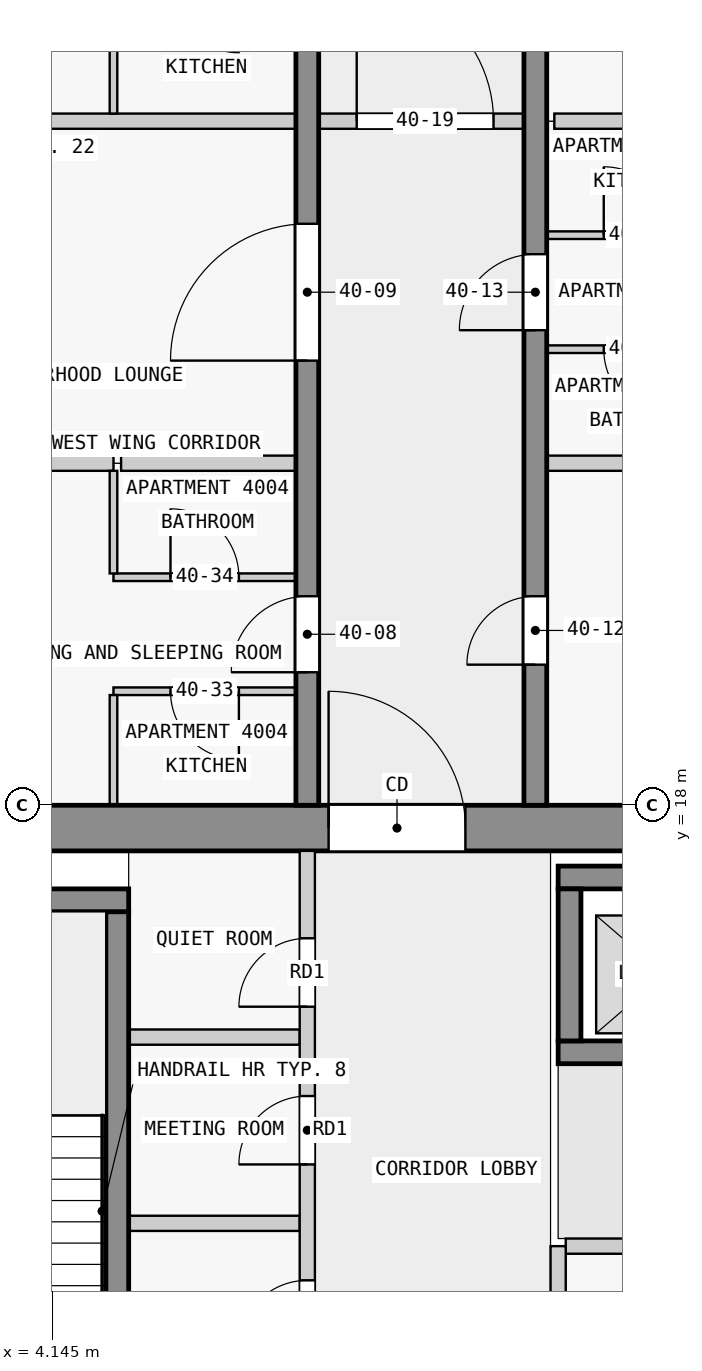
"""IFC4 building model, lengths in metres.
Left out: names, types, materials, properties, quantities, classifications, styles, units other than length and angle.
Written with IfcOpenShell. Run it as: python <this file> out.ifc"""

import sys

from ifc_helpers import new_model, si_unit, direction, frame, frame_2d, origin, place, context, subcontext, project, spatial, rectangle, extrude, element, fill, save


model = new_model("IFC4")
c1 = context("Model", 3, precision=1e-05, world=origin(), true_north=direction((0.0, 1.0)))
c2 = subcontext(c1, "Body", "Model", "MODEL_VIEW")
j1 = project(units=[si_unit("LENGTHUNIT", "METRE"), si_unit("PLANEANGLEUNIT", "RADIAN")], contexts=[c1])
p1 = place(None, origin())
s1 = spatial("IfcSite", under=j1, at=p1, CompositionType="ELEMENT")
p2 = place(p1, origin())
s2 = spatial("IfcBuilding", under=s1, at=p2, CompositionType="ELEMENT")
p3 = place(p2, frame((0.0, 0.0, 156.9)))
s3 = spatial("IfcBuildingStorey", under=s2, at=p3, CompositionType="ELEMENT", Elevation=156.9)
p4 = place(p3, frame((1.38, 17.7, 0.0), z_axis=(0.0, 0.0, 1.0), x_axis=(1.0, 0.0, 0.0)))
e1 = element("IfcWall", 1, at=p4, inside=s3, PredefinedType="SHEAR", context=c2, shape_type="SweptSolid", body=[
    extrude(rectangle(XDim=21.12, YDim=0.6, at=frame_2d((10.56, 0.0))), origin(), (0.0, 0.0, 1.0), 3.25),
])
p5 = place(p4, frame((6.4, 0.0, 0.0)))
e2 = element("IfcOpeningElement", 2, at=p5, cuts=e1, PredefinedType="OPENING", context=c2, shape_type="SweptSolid", body=[
    extrude(rectangle(XDim=1.8, YDim=2.1, at=frame_2d((0.9, 1.05))), frame((0.0, 0.31, 0.0), z_axis=(0.0, -1.0, 0.0), x_axis=(1.0, 0.0, 0.0)), (0.0, 0.0, 1.0), 0.62),
])
p6 = place(p3, frame((5.0, 10.2, 0.0), z_axis=(0.0, 0.0, 1.0), x_axis=(0.0, 1.0, 0.0)))
e3 = element("IfcWall", 3, at=p6, inside=s3, PredefinedType="SHEAR", context=c2, shape_type="SweptSolid", body=[
    extrude(rectangle(XDim=6.4, YDim=0.3, at=frame_2d((3.2, 0.0))), origin(), (0.0, 0.0, 1.0), 3.25),
])
p7 = place(p3, frame((2.3, 16.75, 0.0), z_axis=(0.0, 0.0, 1.0), x_axis=(1.0, 0.0, 0.0)))
e4 = element("IfcWall", 4, at=p7, inside=s3, PredefinedType="SHEAR", context=c2, shape_type="SweptSolid", body=[
    extrude(rectangle(XDim=2.85, YDim=0.3, at=frame_2d((1.425, 0.0))), origin(), (0.0, 0.0, 1.0), 3.25),
])
p8 = place(p3, frame((10.8, 17.05, 0.0), z_axis=(0.0, 0.0, 1.0), x_axis=(1.0, 0.0, 0.0)))
e5 = element("IfcWall", 5, at=p8, inside=s3, PredefinedType="SHEAR", context=c2, shape_type="SweptSolid", body=[
    extrude(rectangle(XDim=7.8, YDim=0.3, at=frame_2d((3.9, 0.0))), origin(), (0.0, 0.0, 1.0), 3.25),
])
p9 = place(p3, frame((10.8, 14.75, 0.0), z_axis=(0.0, 0.0, 1.0), x_axis=(1.0, 0.0, 0.0)))
e6 = element("IfcWall", 6, at=p9, inside=s3, PredefinedType="SHEAR", context=c2, shape_type="SweptSolid", body=[
    extrude(rectangle(XDim=7.8, YDim=0.3, at=frame_2d((3.9, 0.0))), origin(), (0.0, 0.0, 1.0), 3.25),
])
p10 = place(p9, frame((0.85, 0.0, 0.0)))
e7 = element("IfcOpeningElement", 7, at=p10, cuts=e6, PredefinedType="OPENING", context=c2, shape_type="SweptSolid", body=[
    extrude(rectangle(XDim=1.1, YDim=2.1, at=frame_2d((0.55, 1.05))), frame((0.0, 0.16, 0.0), z_axis=(0.0, -1.0, 0.0), x_axis=(1.0, 0.0, 0.0)), (0.0, 0.0, 1.0), 0.32),
])
p11 = place(p9, frame((3.35, 0.0, 0.0)))
e8 = element("IfcOpeningElement", 8, at=p11, cuts=e6, PredefinedType="OPENING", context=c2, shape_type="SweptSolid", body=[
    extrude(rectangle(XDim=1.1, YDim=2.1, at=frame_2d((0.55, 1.05))), frame((0.0, 0.16, 0.0), z_axis=(0.0, -1.0, 0.0), x_axis=(1.0, 0.0, 0.0)), (0.0, 0.0, 1.0), 0.32),
])
p12 = place(p9, frame((5.85, 0.0, 0.0)))
e9 = element("IfcOpeningElement", 9, at=p12, cuts=e6, PredefinedType="OPENING", context=c2, shape_type="SweptSolid", body=[
    extrude(rectangle(XDim=1.1, YDim=2.1, at=frame_2d((0.55, 1.05))), frame((0.0, 0.16, 0.0), z_axis=(0.0, -1.0, 0.0), x_axis=(1.0, 0.0, 0.0)), (0.0, 0.0, 1.0), 0.32),
])
p13 = place(p3, frame((10.95, 14.9, 0.0), z_axis=(0.0, 0.0, 1.0), x_axis=(0.0, 1.0, 0.0)))
e10 = element("IfcWall", 10, at=p13, inside=s3, PredefinedType="SHEAR", context=c2, shape_type="SweptSolid", body=[
    extrude(rectangle(XDim=2.0, YDim=0.3, at=frame_2d((1.0, 0.0))), origin(), (0.0, 0.0, 1.0), 3.25),
])
p14 = place(p3, frame((7.5, 18.0, 0.0), z_axis=(0.0, 0.0, 1.0), x_axis=(0.0, 1.0, 0.0)))
e11 = element("IfcWall", 11, at=p14, inside=s3, PredefinedType="SHEAR", context=c2, shape_type="SweptSolid", body=[
    extrude(rectangle(XDim=27.0, YDim=0.3, at=frame_2d((13.5, 0.0))), origin(), (0.0, 0.0, 1.0), 3.25),
])
p15 = place(p14, frame((1.75, 0.0, 0.0)))
e12 = element("IfcOpeningElement", 12, at=p15, cuts=e11, PredefinedType="OPENING", context=c2, shape_type="SweptSolid", body=[
    extrude(rectangle(XDim=1.0, YDim=2.1, at=frame_2d((0.5, 1.05))), frame((0.0, 0.16, 0.0), z_axis=(0.0, -1.0, 0.0), x_axis=(1.0, 0.0, 0.0)), (0.0, 0.0, 1.0), 0.32),
])
p16 = place(p14, frame((5.85, 0.0, 0.0)))
e13 = element("IfcOpeningElement", 13, at=p16, cuts=e11, PredefinedType="OPENING", context=c2, shape_type="SweptSolid", body=[
    extrude(rectangle(XDim=1.8, YDim=2.1, at=frame_2d((0.9, 1.05))), frame((0.0, 0.16, 0.0), z_axis=(0.0, -1.0, 0.0), x_axis=(1.0, 0.0, 0.0)), (0.0, 0.0, 1.0), 0.32),
])
p17 = place(p14, frame((13.05, 0.0, 0.0)))
e14 = element("IfcOpeningElement", 14, at=p17, cuts=e11, PredefinedType="OPENING", context=c2, shape_type="SweptSolid", body=[
    extrude(rectangle(XDim=1.0, YDim=2.1, at=frame_2d((0.5, 1.05))), frame((0.0, 0.16, 0.0), z_axis=(0.0, -1.0, 0.0), x_axis=(1.0, 0.0, 0.0)), (0.0, 0.0, 1.0), 0.32),
])
p18 = place(p14, frame((21.35, 0.0, 0.0)))
e15 = element("IfcOpeningElement", 15, at=p18, cuts=e11, PredefinedType="OPENING", context=c2, shape_type="SweptSolid", body=[
    extrude(rectangle(XDim=1.0, YDim=2.1, at=frame_2d((0.5, 1.05))), frame((0.0, 0.16, 0.0), z_axis=(0.0, -1.0, 0.0), x_axis=(1.0, 0.0, 0.0)), (0.0, 0.0, 1.0), 0.32),
])
p19 = place(p3, frame((10.5, 18.0, 0.0), z_axis=(0.0, 0.0, 1.0), x_axis=(0.0, 1.0, 0.0)))
e16 = element("IfcWall", 16, at=p19, inside=s3, PredefinedType="SHEAR", context=c2, shape_type="SweptSolid", body=[
    extrude(rectangle(XDim=27.0, YDim=0.3, at=frame_2d((13.5, 0.0))), origin(), (0.0, 0.0, 1.0), 3.25),
])
p20 = place(p19, frame((1.85, 0.0, 0.0)))
e17 = element("IfcOpeningElement", 17, at=p20, cuts=e16, PredefinedType="OPENING", context=c2, shape_type="SweptSolid", body=[
    extrude(rectangle(XDim=0.9, YDim=2.1, at=frame_2d((0.45, 1.05))), frame((0.0, 0.16, 0.0), z_axis=(0.0, -1.0, 0.0), x_axis=(1.0, 0.0, 0.0)), (0.0, 0.0, 1.0), 0.32),
])
p21 = place(p19, frame((6.25, 0.0, 0.0)))
e18 = element("IfcOpeningElement", 18, at=p21, cuts=e16, PredefinedType="OPENING", context=c2, shape_type="SweptSolid", body=[
    extrude(rectangle(XDim=1.0, YDim=2.1, at=frame_2d((0.5, 1.05))), frame((0.0, 0.16, 0.0), z_axis=(0.0, -1.0, 0.0), x_axis=(1.0, 0.0, 0.0)), (0.0, 0.0, 1.0), 0.32),
])
p22 = place(p19, frame((10.85, 0.0, 0.0)))
e19 = element("IfcOpeningElement", 19, at=p22, cuts=e16, PredefinedType="OPENING", context=c2, shape_type="SweptSolid", body=[
    extrude(rectangle(XDim=0.9, YDim=2.1, at=frame_2d((0.45, 1.05))), frame((0.0, 0.16, 0.0), z_axis=(0.0, -1.0, 0.0), x_axis=(1.0, 0.0, 0.0)), (0.0, 0.0, 1.0), 0.32),
])
p23 = place(p19, frame((17.55, 0.0, 0.0)))
e20 = element("IfcOpeningElement", 20, at=p23, cuts=e16, PredefinedType="OPENING", context=c2, shape_type="SweptSolid", body=[
    extrude(rectangle(XDim=1.0, YDim=2.1, at=frame_2d((0.5, 1.05))), frame((0.0, 0.16, 0.0), z_axis=(0.0, -1.0, 0.0), x_axis=(1.0, 0.0, 0.0)), (0.0, 0.0, 1.0), 0.32),
])
p24 = place(p19, frame((23.25, 0.0, 0.0)))
e21 = element("IfcOpeningElement", 21, at=p24, cuts=e16, PredefinedType="OPENING", context=c2, shape_type="SweptSolid", body=[
    extrude(rectangle(XDim=0.9, YDim=2.1, at=frame_2d((0.45, 1.05))), frame((0.0, 0.16, 0.0), z_axis=(0.0, -1.0, 0.0), x_axis=(1.0, 0.0, 0.0)), (0.0, 0.0, 1.0), 0.32),
])
p25 = place(p19, frame((25.45, 0.0, 0.0)))
e22 = element("IfcOpeningElement", 22, at=p25, cuts=e16, PredefinedType="OPENING", context=c2, shape_type="SweptSolid", body=[
    extrude(rectangle(XDim=1.0, YDim=2.1, at=frame_2d((0.5, 1.05))), frame((0.0, 0.16, 0.0), z_axis=(0.0, -1.0, 0.0), x_axis=(1.0, 0.0, 0.0)), (0.0, 0.0, 1.0), 0.32),
])
p26 = place(p3, frame((10.8, 8.4, 0.0), z_axis=(0.0, 0.0, 1.0), x_axis=(0.0, 1.0, 0.0)))
e23 = element("IfcWall", 23, at=p26, inside=s3, PredefinedType="PARTITIONING", context=c2, shape_type="SweptSolid", body=[
    extrude(rectangle(XDim=3.8, YDim=0.2, at=frame_2d((1.9, 0.0))), origin(), (0.0, 0.0, 1.0), 3.25),
])
p27 = place(p3, frame((10.9, 12.2, 0.0), z_axis=(0.0, 0.0, 1.0), x_axis=(1.0, 0.0, 0.0)))
e24 = element("IfcWall", 24, at=p27, inside=s3, PredefinedType="PARTITIONING", context=c2, shape_type="SweptSolid", body=[
    extrude(rectangle(XDim=6.1, YDim=0.2, at=frame_2d((3.05, 0.0))), origin(), (0.0, 0.0, 1.0), 3.25),
])
p28 = place(p27, frame((2.6, 0.0, 0.0)))
e25 = element("IfcOpeningElement", 25, at=p28, cuts=e24, PredefinedType="OPENING", context=c2, shape_type="SweptSolid", body=[
    extrude(rectangle(XDim=0.9, YDim=2.1, at=frame_2d((0.45, 1.05))), frame((0.0, 0.11, 0.0), z_axis=(0.0, -1.0, 0.0), x_axis=(1.0, 0.0, 0.0)), (0.0, 0.0, 1.0), 0.22),
])
p29 = place(p3, frame((7.5, 10.1, 0.0), z_axis=(0.0, 0.0, 1.0), x_axis=(0.0, 1.0, 0.0)))
e26 = element("IfcWall", 26, at=p29, inside=s3, PredefinedType="PARTITIONING", context=c2, shape_type="SweptSolid", body=[
    extrude(rectangle(XDim=7.3, YDim=0.2, at=frame_2d((3.65, 0.0))), origin(), (0.0, 0.0, 1.0), 3.25),
])
p30 = place(p29, frame((0.75, 0.0, 0.0)))
e27 = element("IfcOpeningElement", 27, at=p30, cuts=e26, PredefinedType="OPENING", context=c2, shape_type="SweptSolid", body=[
    extrude(rectangle(XDim=0.9, YDim=2.1, at=frame_2d((0.45, 1.05))), frame((0.0, 0.11, 0.0), z_axis=(0.0, -1.0, 0.0), x_axis=(1.0, 0.0, 0.0)), (0.0, 0.0, 1.0), 0.22),
])
p31 = place(p29, frame((3.175, 0.0, 0.0)))
e28 = element("IfcOpeningElement", 28, at=p31, cuts=e26, PredefinedType="OPENING", context=c2, shape_type="SweptSolid", body=[
    extrude(rectangle(XDim=0.9, YDim=2.1, at=frame_2d((0.45, 1.05))), frame((0.0, 0.11, 0.0), z_axis=(0.0, -1.0, 0.0), x_axis=(1.0, 0.0, 0.0)), (0.0, 0.0, 1.0), 0.22),
])
p32 = place(p29, frame((5.25, 0.0, 0.0)))
e29 = element("IfcOpeningElement", 29, at=p32, cuts=e26, PredefinedType="OPENING", context=c2, shape_type="SweptSolid", body=[
    extrude(rectangle(XDim=0.9, YDim=2.1, at=frame_2d((0.45, 1.05))), frame((0.0, 0.11, 0.0), z_axis=(0.0, -1.0, 0.0), x_axis=(1.0, 0.0, 0.0)), (0.0, 0.0, 1.0), 0.22),
])
for number, where, z_axis, x_axis in (
    (30, (5.15, 12.5, 0.0), (0.0, 0.0, 1.0), (1.0, 0.0, 0.0)),
    (31, (5.15, 14.95, 0.0), (0.0, 0.0, 1.0), (1.0, 0.0, 0.0)),
):
    element("IfcWall", number, at=place(p3, frame(where, z_axis=z_axis, x_axis=x_axis)), inside=s3, PredefinedType="PARTITIONING", context=c2, shape_type="SweptSolid", body=[
        extrude(rectangle(XDim=2.25, YDim=0.2, at=frame_2d((1.125, 0.0))), origin(), (0.0, 0.0, 1.0), 3.25),
    ])
p33 = place(p3, frame((7.35, 19.5, 0.0), z_axis=(0.0, 0.0, 1.0), x_axis=(-1.0, 0.0, 0.0)))
e32 = element("IfcWall", 32, at=p33, inside=s3, PredefinedType="PARTITIONING", context=c2, shape_type="SweptSolid", body=[
    extrude(rectangle(XDim=2.4, YDim=0.1, at=frame_2d((1.2, 0.0))), origin(), (0.0, 0.0, 1.0), 3.25),
])
p34 = place(p33, frame((0.75, 0.0, 0.0)))
e33 = element("IfcOpeningElement", 33, at=p34, cuts=e32, PredefinedType="OPENING", context=c2, shape_type="SweptSolid", body=[
    extrude(rectangle(XDim=0.9, YDim=2.1, at=frame_2d((0.45, 1.05))), frame((0.0, 0.06, 0.0), z_axis=(0.0, -1.0, 0.0), x_axis=(1.0, 0.0, 0.0)), (0.0, 0.0, 1.0), 0.12),
])
p35 = place(p3, frame((4.95, 21.0, 0.0), z_axis=(0.0, 0.0, 1.0), x_axis=(1.0, 0.0, 0.0)))
e34 = element("IfcWall", 34, at=p35, inside=s3, PredefinedType="PARTITIONING", context=c2, shape_type="SweptSolid", body=[
    extrude(rectangle(XDim=2.4, YDim=0.1, at=frame_2d((1.2, 0.0))), origin(), (0.0, 0.0, 1.0), 3.25),
])
p36 = place(p35, frame((0.75, 0.0, 0.0)))
e35 = element("IfcOpeningElement", 35, at=p36, cuts=e34, PredefinedType="OPENING", context=c2, shape_type="SweptSolid", body=[
    extrude(rectangle(XDim=0.9, YDim=2.1, at=frame_2d((0.45, 1.05))), frame((0.0, 0.06, 0.0), z_axis=(0.0, -1.0, 0.0), x_axis=(1.0, 0.0, 0.0)), (0.0, 0.0, 1.0), 0.12),
])
p37 = place(p3, frame((7.35, 22.5, 0.0), z_axis=(0.0, 0.0, 1.0), x_axis=(-1.0, 0.0, 0.0)))
e36 = element("IfcWall", 36, at=p37, inside=s3, PredefinedType="PARTITIONING", context=c2, shape_type="SweptSolid", body=[
    extrude(rectangle(XDim=2.3, YDim=0.2, at=frame_2d((1.15, 0.0))), origin(), (0.0, 0.0, 1.0), 3.25),
])
p38 = place(p3, frame((17.85, 22.5, 0.0), z_axis=(0.0, 0.0, 1.0), x_axis=(-1.0, 0.0, 0.0)))
e37 = element("IfcWall", 37, at=p38, inside=s3, PredefinedType="PARTITIONING", context=c2, shape_type="SweptSolid", body=[
    extrude(rectangle(XDim=7.2, YDim=0.2, at=frame_2d((3.6, 0.0))), origin(), (0.0, 0.0, 1.0), 3.25),
])
p39 = place(p3, frame((-0.08, 22.5, 0.0), z_axis=(0.0, 0.0, 1.0), x_axis=(1.0, 0.0, 0.0)))
e38 = element("IfcWall", 38, at=p39, inside=s3, PredefinedType="PARTITIONING", context=c2, shape_type="SweptSolid", body=[
    extrude(rectangle(XDim=5.03, YDim=0.2, at=frame_2d((2.515, 0.0))), origin(), (0.0, 0.0, 1.0), 3.25),
])
p40 = place(p3, frame((13.05, 24.0, 0.0), z_axis=(0.0, 0.0, 1.0), x_axis=(-1.0, 0.0, 0.0)))
e39 = element("IfcWall", 39, at=p40, inside=s3, PredefinedType="PARTITIONING", context=c2, shape_type="SweptSolid", body=[
    extrude(rectangle(XDim=2.4, YDim=0.1, at=frame_2d((1.2, 0.0))), origin(), (0.0, 0.0, 1.0), 3.25),
])
p41 = place(p40, frame((0.75, 0.0, 0.0)))
e40 = element("IfcOpeningElement", 40, at=p41, cuts=e39, PredefinedType="OPENING", context=c2, shape_type="SweptSolid", body=[
    extrude(rectangle(XDim=0.9, YDim=2.1, at=frame_2d((0.45, 1.05))), frame((0.0, 0.06, 0.0), z_axis=(0.0, -1.0, 0.0), x_axis=(1.0, 0.0, 0.0)), (0.0, 0.0, 1.0), 0.12),
])
p42 = place(p3, frame((10.65, 25.5, 0.0), z_axis=(0.0, 0.0, 1.0), x_axis=(1.0, 0.0, 0.0)))
e41 = element("IfcWall", 41, at=p42, inside=s3, PredefinedType="PARTITIONING", context=c2, shape_type="SweptSolid", body=[
    extrude(rectangle(XDim=2.4, YDim=0.1, at=frame_2d((1.2, 0.0))), origin(), (0.0, 0.0, 1.0), 3.25),
])
p43 = place(p42, frame((0.75, 0.0, 0.0)))
e42 = element("IfcOpeningElement", 42, at=p43, cuts=e41, PredefinedType="OPENING", context=c2, shape_type="SweptSolid", body=[
    extrude(rectangle(XDim=0.9, YDim=2.1, at=frame_2d((0.45, 1.05))), frame((0.0, 0.06, 0.0), z_axis=(0.0, -1.0, 0.0), x_axis=(1.0, 0.0, 0.0)), (0.0, 0.0, 1.0), 0.12),
])
p44 = place(p3, frame((7.35, 27.0, 0.0), z_axis=(0.0, 0.0, 1.0), x_axis=(-1.0, 0.0, 0.0)))
e43 = element("IfcWall", 43, at=p44, inside=s3, PredefinedType="PARTITIONING", context=c2, shape_type="SweptSolid", body=[
    extrude(rectangle(XDim=7.43, YDim=0.2, at=frame_2d((3.715, 0.0))), origin(), (0.0, 0.0, 1.0), 3.25),
])
p45 = place(p3, frame((12.95, 27.0, 0.0), z_axis=(0.0, 0.0, 1.0), x_axis=(-1.0, 0.0, 0.0)))
e44 = element("IfcWall", 44, at=p45, inside=s3, PredefinedType="PARTITIONING", context=c2, shape_type="SweptSolid", body=[
    extrude(rectangle(XDim=2.2, YDim=0.2, at=frame_2d((1.1, 0.0))), origin(), (0.0, 0.0, 1.0), 3.25),
])
p46 = place(p3, frame((4.95, 19.45, 0.0), z_axis=(0.0, 0.0, 1.0), x_axis=(0.0, -1.0, 0.0)))
e45 = element("IfcWall", 45, at=p46, inside=s3, PredefinedType="PARTITIONING", context=c2, shape_type="SweptSolid", body=[
    extrude(rectangle(XDim=1.45, YDim=0.1, at=frame_2d((0.725, 0.0))), origin(), (0.0, 0.0, 1.0), 3.25),
])
p47 = place(p3, frame((4.95, 22.4, 0.0), z_axis=(0.0, 0.0, 1.0), x_axis=(0.0, -1.0, 0.0)))
e46 = element("IfcWall", 46, at=p47, inside=s3, PredefinedType="PARTITIONING", context=c2, shape_type="SweptSolid", body=[
    extrude(rectangle(XDim=1.35, YDim=0.1, at=frame_2d((0.675, 0.0))), origin(), (0.0, 0.0, 1.0), 3.25),
])
p48 = place(p3, frame((4.95, 28.75, 0.0), z_axis=(0.0, 0.0, 1.0), x_axis=(0.0, -1.0, 0.0)))
e47 = element("IfcWall", 47, at=p48, inside=s3, PredefinedType="PARTITIONING", context=c2, shape_type="SweptSolid", body=[
    extrude(rectangle(XDim=1.65, YDim=0.1, at=frame_2d((0.825, 0.0))), origin(), (0.0, 0.0, 1.0), 3.25),
])
p49 = place(p3, frame((7.45, 27.0, 0.0), z_axis=(0.0, 0.0, 1.0), x_axis=(1.0, 0.0, 0.0)))
e48 = element("IfcWall", 48, at=p49, inside=s3, PredefinedType="PARTITIONING", context=c2, shape_type="SweptSolid", body=[
    extrude(rectangle(XDim=3.2, YDim=0.2, at=frame_2d((1.6, 0.0))), origin(), (0.0, 0.0, 1.0), 3.25),
])
p50 = place(p49, frame((0.7, 0.0, 0.0)))
e49 = element("IfcOpeningElement", 49, at=p50, cuts=e48, PredefinedType="OPENING", context=c2, shape_type="SweptSolid", body=[
    extrude(rectangle(XDim=1.8, YDim=2.1, at=frame_2d((0.9, 1.05))), frame((0.0, 0.11, 0.0), z_axis=(0.0, -1.0, 0.0), x_axis=(1.0, 0.0, 0.0)), (0.0, 0.0, 1.0), 0.22),
])
p51 = place(p5, origin())
e50 = element("IfcDoor", 50, at=p51, inside=s3, OperationType="DOUBLE_DOOR_SINGLE_SWING", PredefinedType="DOOR", context=c2, shape_type="SweptSolid", body=[
    extrude(rectangle(XDim=1.8, YDim=2.1, at=frame_2d((0.9, 1.05))), frame((0.0, 0.025, 0.0), z_axis=(0.0, -1.0, 0.0), x_axis=(1.0, 0.0, 0.0)), (0.0, 0.0, 1.0), 0.05),
])
fill(e2, e50)
p52 = place(p30, origin())
e51 = element("IfcDoor", 51, at=p52, inside=s3, OperationType="SINGLE_SWING_RIGHT", PredefinedType="DOOR", context=c2, shape_type="SweptSolid", body=[
    extrude(rectangle(XDim=0.9, YDim=2.1, at=frame_2d((0.45, 1.05))), frame((0.0, 0.025, 0.0), z_axis=(0.0, -1.0, 0.0), x_axis=(1.0, 0.0, 0.0)), (0.0, 0.0, 1.0), 0.05),
])
fill(e27, e51)
p53 = place(p31, origin())
e52 = element("IfcDoor", 52, at=p53, inside=s3, OperationType="SINGLE_SWING_RIGHT", PredefinedType="DOOR", context=c2, shape_type="SweptSolid", body=[
    extrude(rectangle(XDim=0.9, YDim=2.1, at=frame_2d((0.45, 1.05))), frame((0.0, 0.025, 0.0), z_axis=(0.0, -1.0, 0.0), x_axis=(1.0, 0.0, 0.0)), (0.0, 0.0, 1.0), 0.05),
])
fill(e28, e52)
p54 = place(p32, origin())
e53 = element("IfcDoor", 53, at=p54, inside=s3, OperationType="SINGLE_SWING_RIGHT", PredefinedType="DOOR", context=c2, shape_type="SweptSolid", body=[
    extrude(rectangle(XDim=0.9, YDim=2.1, at=frame_2d((0.45, 1.05))), frame((0.0, 0.025, 0.0), z_axis=(0.0, -1.0, 0.0), x_axis=(1.0, 0.0, 0.0)), (0.0, 0.0, 1.0), 0.05),
])
fill(e29, e53)
p55 = place(p15, origin())
e54 = element("IfcDoor", 54, at=p55, inside=s3, OperationType="SINGLE_SWING_LEFT", PredefinedType="DOOR", context=c2, shape_type="SweptSolid", body=[
    extrude(rectangle(XDim=1.0, YDim=2.1, at=frame_2d((0.5, 1.05))), frame((0.0, 0.025, 0.0), z_axis=(0.0, -1.0, 0.0), x_axis=(1.0, 0.0, 0.0)), (0.0, 0.0, 1.0), 0.05),
])
fill(e12, e54)
p56 = place(p16, origin())
e55 = element("IfcDoor", 55, at=p56, inside=s3, OperationType="SINGLE_SWING_LEFT", PredefinedType="DOOR", context=c2, shape_type="SweptSolid", body=[
    extrude(rectangle(XDim=1.8, YDim=2.1, at=frame_2d((0.9, 1.05))), frame((0.0, 0.025, 0.0), z_axis=(0.0, -1.0, 0.0), x_axis=(1.0, 0.0, 0.0)), (0.0, 0.0, 1.0), 0.05),
])
fill(e13, e55)
p57 = place(p20, origin())
e56 = element("IfcDoor", 56, at=p57, inside=s3, OperationType="SINGLE_SWING_LEFT", PredefinedType="DOOR", context=c2, shape_type="SweptSolid", body=[
    extrude(rectangle(XDim=0.9, YDim=2.1, at=frame_2d((0.45, 1.05))), frame((0.0, 0.025, 0.0), z_axis=(0.0, -1.0, 0.0), x_axis=(1.0, 0.0, 0.0)), (0.0, 0.0, 1.0), 0.05),
])
fill(e17, e56)
p58 = place(p21, origin())
e57 = element("IfcDoor", 57, at=p58, inside=s3, OperationType="SINGLE_SWING_LEFT", PredefinedType="DOOR", context=c2, shape_type="SweptSolid", body=[
    extrude(rectangle(XDim=1.0, YDim=2.1, at=frame_2d((0.5, 1.05))), frame((0.0, 0.025, 0.0), z_axis=(0.0, -1.0, 0.0), x_axis=(1.0, 0.0, 0.0)), (0.0, 0.0, 1.0), 0.05),
])
fill(e18, e57)
p59 = place(p50, origin())
e58 = element("IfcDoor", 58, at=p59, inside=s3, OperationType="SINGLE_SWING_LEFT", PredefinedType="DOOR", context=c2, shape_type="SweptSolid", body=[
    extrude(rectangle(XDim=1.8, YDim=2.1, at=frame_2d((0.9, 1.05))), frame((0.0, 0.025, 0.0), z_axis=(0.0, -1.0, 0.0), x_axis=(1.0, 0.0, 0.0)), (0.0, 0.0, 1.0), 0.05),
])
fill(e49, e58)
p60 = place(p34, origin())
e59 = element("IfcDoor", 59, at=p60, inside=s3, OperationType="SINGLE_SWING_RIGHT", PredefinedType="DOOR", context=c2, shape_type="SweptSolid", body=[
    extrude(rectangle(XDim=0.9, YDim=2.1, at=frame_2d((0.45, 1.05))), frame((0.0, 0.025, 0.0), z_axis=(0.0, -1.0, 0.0), x_axis=(1.0, 0.0, 0.0)), (0.0, 0.0, 1.0), 0.05),
])
fill(e33, e59)
p61 = place(p36, origin())
e60 = element("IfcDoor", 60, at=p61, inside=s3, OperationType="SINGLE_SWING_RIGHT", PredefinedType="DOOR", context=c2, shape_type="SweptSolid", body=[
    extrude(rectangle(XDim=0.9, YDim=2.1, at=frame_2d((0.45, 1.05))), frame((0.0, 0.025, 0.0), z_axis=(0.0, -1.0, 0.0), x_axis=(1.0, 0.0, 0.0)), (0.0, 0.0, 1.0), 0.05),
])
fill(e35, e60)
p62 = place(p41, origin())
e61 = element("IfcDoor", 61, at=p62, inside=s3, OperationType="SINGLE_SWING_LEFT", PredefinedType="DOOR", context=c2, shape_type="SweptSolid", body=[
    extrude(rectangle(XDim=0.9, YDim=2.1, at=frame_2d((0.45, 1.05))), frame((0.0, 0.025, 0.0), z_axis=(0.0, -1.0, 0.0), x_axis=(1.0, 0.0, 0.0)), (0.0, 0.0, 1.0), 0.05),
])
fill(e40, e61)
p63 = place(p43, origin())
e62 = element("IfcDoor", 62, at=p63, inside=s3, OperationType="SINGLE_SWING_LEFT", PredefinedType="DOOR", context=c2, shape_type="SweptSolid", body=[
    extrude(rectangle(XDim=0.9, YDim=2.1, at=frame_2d((0.45, 1.05))), frame((0.0, 0.025, 0.0), z_axis=(0.0, -1.0, 0.0), x_axis=(1.0, 0.0, 0.0)), (0.0, 0.0, 1.0), 0.05),
])
fill(e42, e62)
save(model, sys.argv[1])
